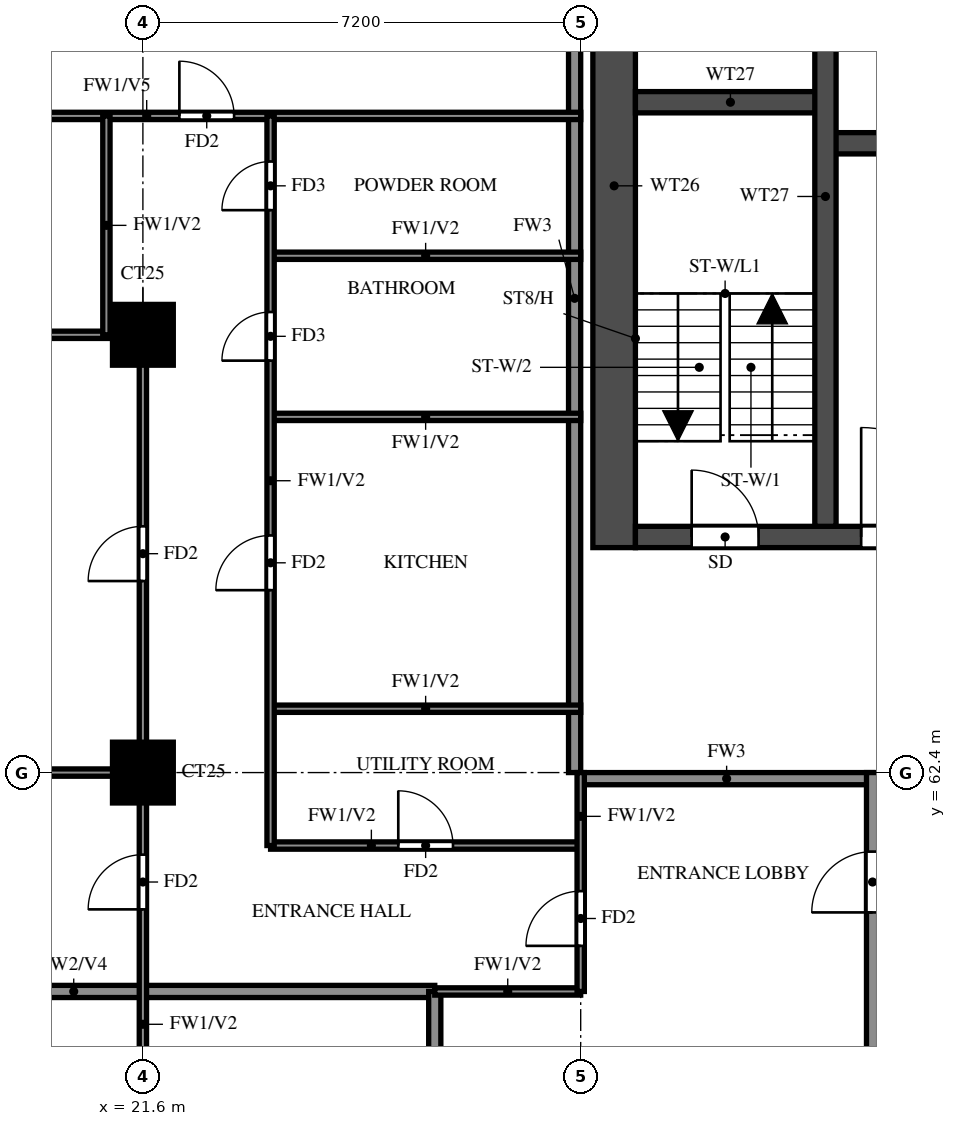
"""IFC4 building model, lengths in metres.
Left out: names, types, materials, properties, quantities, classifications, styles, units other than length and angle.
Written with IfcOpenShell. Run it as: python <this file> out.ifc"""

import sys

from ifc_helpers import new_model, si_unit, direction, frame, frame_2d, origin, origin_2d, place, context, subcontext, project, spatial, rectangle, extrude, source, transform, mapped, element, fill, save


model = new_model("IFC4")
c1 = context("Model", 3, precision=1e-05, world=origin(), true_north=direction((0.0, 1.0)))
c2 = subcontext(c1, "Body", "Model", "MODEL_VIEW")
j1 = project(units=[si_unit("LENGTHUNIT", "METRE"), si_unit("PLANEANGLEUNIT", "RADIAN")], contexts=[c1])
p1 = place(None, origin())
s1 = spatial("IfcSite", under=j1, at=p1, CompositionType="ELEMENT")
p2 = place(p1, origin())
s2 = spatial("IfcBuilding", under=s1, at=p2, CompositionType="ELEMENT")
p3 = place(p2, frame((0.0, 0.0, 157.0)))
s3 = spatial("IfcBuildingStorey", under=s2, at=p3, CompositionType="ELEMENT", Elevation=157.0)
m1 = source(origin(), c2, "Body", "SweptSolid", [
    extrude(rectangle(XDim=1.0, YDim=1.0, at=origin_2d()), origin(), (0.0, 0.0, 1.0), 3.2),
])
for number, where, z_axis, x_axis in (
    (1, (21.6, 62.4, 0.0), (0.0, 0.0, 1.0), (1.0, 0.0, 0.0)),
    (2, (21.6, 69.6, 0.0), (0.0, 0.0, 1.0), (1.0, 0.0, 0.0)),
):
    element("IfcColumn", number, at=place(p3, frame(where, z_axis=z_axis, x_axis=x_axis)), inside=s3, PredefinedType="COLUMN", context=c2, shape_type="MappedRepresentation", body=[
        mapped(m1, transform((0.0, 0.0, 0.0))),
    ])
p4 = place(p3, frame((29.35, 66.1, 0.0), z_axis=(0.0, 0.0, 1.0), x_axis=(0.0, 1.0, 0.0)))
e3 = element("IfcWall", 3, at=p4, inside=s3, PredefinedType="SHEAR", context=c2, shape_type="SweptSolid", body=[
    extrude(rectangle(XDim=11.9, YDim=0.7, at=frame_2d((5.95, 0.0))), origin(), (0.0, 0.0, 1.0), 3.2),
])
p5 = place(p3, frame((29.7, 66.275, 0.0), z_axis=(0.0, 0.0, 1.0), x_axis=(1.0, 0.0, 0.0)))
e4 = element("IfcWall", 4, at=p5, inside=s3, PredefinedType="SHEAR", context=c2, shape_type="SweptSolid", body=[
    extrude(rectangle(XDim=41.4, YDim=0.35, at=frame_2d((20.7, 0.0))), origin(), (0.0, 0.0, 1.0), 3.2),
])
p6 = place(p5, frame((0.925, 0.0, 0.0)))
e5 = element("IfcOpeningElement", 5, at=p6, cuts=e4, PredefinedType="OPENING", context=c2, shape_type="SweptSolid", body=[
    extrude(rectangle(XDim=1.1, YDim=2.1, at=frame_2d((0.55, 1.05))), frame((0.0, 0.185, 0.0), z_axis=(0.0, -1.0, 0.0), x_axis=(1.0, 0.0, 0.0)), (0.0, 0.0, 1.0), 0.37),
])
p7 = place(p5, frame((3.712, 0.0, 0.0)))
e6 = element("IfcOpeningElement", 6, at=p7, cuts=e4, PredefinedType="OPENING", context=c2, shape_type="SweptSolid", body=[
    extrude(rectangle(XDim=1.8, YDim=2.1, at=frame_2d((0.9, 1.05))), frame((0.0, 0.185, 0.0), z_axis=(0.0, -1.0, 0.0), x_axis=(1.0, 0.0, 0.0)), (0.0, 0.0, 1.0), 0.37),
])
p8 = place(p3, frame((32.825, 72.75, 0.0), z_axis=(0.0, 0.0, 1.0), x_axis=(1.0, 0.0, 0.0)))
e7 = element("IfcWall", 7, at=p8, inside=s3, PredefinedType="SHEAR", context=c2, shape_type="SweptSolid", body=[
    extrude(rectangle(XDim=35.15, YDim=0.35, at=frame_2d((17.575, 0.0))), origin(), (0.0, 0.0, 1.0), 3.2),
])
p9 = place(p8, frame((19.8, 0.0, 0.0)))
e8 = element("IfcOpeningElement", 8, at=p9, cuts=e7, PredefinedType="OPENING", context=c2, shape_type="SweptSolid", body=[
    extrude(rectangle(XDim=1.1, YDim=2.1, at=frame_2d((0.55, 1.05))), frame((0.0, 0.185, 0.0), z_axis=(0.0, -1.0, 0.0), x_axis=(1.0, 0.0, 0.0)), (0.0, 0.0, 1.0), 0.37),
])
p10 = place(p8, frame((27.7, 0.0, 0.0)))
e9 = element("IfcOpeningElement", 9, at=p10, cuts=e7, PredefinedType="OPENING", context=c2, shape_type="SweptSolid", body=[
    extrude(rectangle(XDim=1.1, YDim=2.1, at=frame_2d((0.55, 1.05))), frame((0.0, 0.185, 0.0), z_axis=(0.0, -1.0, 0.0), x_axis=(1.0, 0.0, 0.0)), (0.0, 0.0, 1.0), 0.37),
])
p11 = place(p8, frame((30.3, 0.0, 0.0)))
e10 = element("IfcOpeningElement", 10, at=p11, cuts=e7, PredefinedType="OPENING", context=c2, shape_type="SweptSolid", body=[
    extrude(rectangle(XDim=1.1, YDim=2.1, at=frame_2d((0.55, 1.05))), frame((0.0, 0.185, 0.0), z_axis=(0.0, -1.0, 0.0), x_axis=(1.0, 0.0, 0.0)), (0.0, 0.0, 1.0), 0.37),
])
p12 = place(p8, frame((3.8, 0.0, 0.0)))
e11 = element("IfcOpeningElement", 11, at=p12, cuts=e7, PredefinedType="OPENING", context=c2, shape_type="SweptSolid", body=[
    extrude(rectangle(XDim=1.1, YDim=2.1, at=frame_2d((0.55, 1.05))), frame((0.0, 0.185, 0.0), z_axis=(0.0, -1.0, 0.0), x_axis=(1.0, 0.0, 0.0)), (0.0, 0.0, 1.0), 0.37),
])
p13 = place(p8, frame((6.55, 0.0, 0.0)))
e12 = element("IfcOpeningElement", 12, at=p13, cuts=e7, PredefinedType="OPENING", context=c2, shape_type="SweptSolid", body=[
    extrude(rectangle(XDim=1.1, YDim=2.1, at=frame_2d((0.55, 1.05))), frame((0.0, 0.185, 0.0), z_axis=(0.0, -1.0, 0.0), x_axis=(1.0, 0.0, 0.0)), (0.0, 0.0, 1.0), 0.37),
])
p14 = place(p8, frame((9.3, 0.0, 0.0)))
e13 = element("IfcOpeningElement", 13, at=p14, cuts=e7, PredefinedType="OPENING", context=c2, shape_type="SweptSolid", body=[
    extrude(rectangle(XDim=1.1, YDim=2.1, at=frame_2d((0.55, 1.05))), frame((0.0, 0.185, 0.0), z_axis=(0.0, -1.0, 0.0), x_axis=(1.0, 0.0, 0.0)), (0.0, 0.0, 1.0), 0.37),
])
p15 = place(p8, frame((12.05, 0.0, 0.0)))
e14 = element("IfcOpeningElement", 14, at=p15, cuts=e7, PredefinedType="OPENING", context=c2, shape_type="SweptSolid", body=[
    extrude(rectangle(XDim=1.1, YDim=2.1, at=frame_2d((0.55, 1.05))), frame((0.0, 0.185, 0.0), z_axis=(0.0, -1.0, 0.0), x_axis=(1.0, 0.0, 0.0)), (0.0, 0.0, 1.0), 0.37),
])
p16 = place(p8, frame((14.8, 0.0, 0.0)))
e15 = element("IfcOpeningElement", 15, at=p16, cuts=e7, PredefinedType="OPENING", context=c2, shape_type="SweptSolid", body=[
    extrude(rectangle(XDim=1.1, YDim=2.1, at=frame_2d((0.55, 1.05))), frame((0.0, 0.185, 0.0), z_axis=(0.0, -1.0, 0.0), x_axis=(1.0, 0.0, 0.0)), (0.0, 0.0, 1.0), 0.37),
])
p17 = place(p8, frame((17.55, 0.0, 0.0)))
e16 = element("IfcOpeningElement", 16, at=p17, cuts=e7, PredefinedType="OPENING", context=c2, shape_type="SweptSolid", body=[
    extrude(rectangle(XDim=1.1, YDim=2.1, at=frame_2d((0.55, 1.05))), frame((0.0, 0.185, 0.0), z_axis=(0.0, -1.0, 0.0), x_axis=(1.0, 0.0, 0.0)), (0.0, 0.0, 1.0), 0.37),
])
p18 = place(p8, frame((0.938, 0.0, 0.0)))
e17 = element("IfcOpeningElement", 17, at=p18, cuts=e7, PredefinedType="OPENING", context=c2, shape_type="SweptSolid", body=[
    extrude(rectangle(XDim=1.1, YDim=2.1, at=frame_2d((0.55, 1.05))), frame((0.0, 0.185, 0.0), z_axis=(0.0, -1.0, 0.0), x_axis=(1.0, 0.0, 0.0)), (0.0, 0.0, 1.0), 0.37),
])
p19 = place(p3, frame((29.7, 73.425, 0.0), z_axis=(0.0, 0.0, 1.0), x_axis=(1.0, 0.0, 0.0)))
e18 = element("IfcWall", 18, at=p19, inside=s3, PredefinedType="SHEAR", context=c2, shape_type="SweptSolid", body=[
    extrude(rectangle(XDim=3.125, YDim=0.35, at=frame_2d((1.562, 0.0))), origin(), (0.0, 0.0, 1.0), 3.2),
])
p20 = place(p3, frame((32.825, 66.45, 0.0), z_axis=(0.0, 0.0, 1.0), x_axis=(0.0, 1.0, 0.0)))
e19 = element("IfcWall", 19, at=p20, inside=s3, PredefinedType="SHEAR", context=c2, shape_type="SweptSolid", body=[
    extrude(rectangle(XDim=10.85, YDim=0.35, at=frame_2d((5.425, 0.0))), origin(), (0.0, 0.0, 1.0), 3.2),
])
p21 = place(p3, frame((28.8, 62.3, 0.0), z_axis=(0.0, 0.0, 1.0), x_axis=(1.0, 0.0, 0.0)))
e20 = element("IfcWall", 20, at=p21, inside=s3, PredefinedType="SOLIDWALL", context=c2, shape_type="SweptSolid", body=[
    extrude(rectangle(XDim=4.8, YDim=0.2, at=frame_2d((2.4, 0.0))), origin(), (0.0, 0.0, 1.0), 3.2),
])
p22 = place(p3, frame((28.7, 62.4, 0.0), z_axis=(0.0, 0.0, 1.0), x_axis=(0.0, 1.0, 0.0)))
e21 = element("IfcWall", 21, at=p22, inside=s3, PredefinedType="SOLIDWALL", context=c2, shape_type="SweptSolid", body=[
    extrude(rectangle(XDim=15.6, YDim=0.2, at=frame_2d((7.8, 0.0))), origin(), (0.0, 0.0, 1.0), 3.2),
])
p23 = place(p3, frame((33.6, 50.4, 0.0), z_axis=(0.0, 0.0, 1.0), x_axis=(0.0, 1.0, 0.0)))
e22 = element("IfcWall", 22, at=p23, inside=s3, PredefinedType="SOLIDWALL", context=c2, shape_type="SweptSolid", body=[
    extrude(rectangle(XDim=12.0, YDim=0.2, at=frame_2d((6.0, 0.0))), origin(), (0.0, 0.0, 1.0), 3.2),
])
p24 = place(p23, frame((0.7, 0.0, 0.0)))
e23 = element("IfcOpeningElement", 23, at=p24, cuts=e22, PredefinedType="OPENING", context=c2, shape_type="SweptSolid", body=[
    extrude(rectangle(XDim=1.0, YDim=2.1, at=frame_2d((0.5, 1.05))), frame((0.0, 0.11, 0.0), z_axis=(0.0, -1.0, 0.0), x_axis=(1.0, 0.0, 0.0)), (0.0, 0.0, 1.0), 0.22),
])
p25 = place(p23, frame((9.7, 0.0, 0.0)))
e24 = element("IfcOpeningElement", 24, at=p25, cuts=e22, PredefinedType="OPENING", context=c2, shape_type="SweptSolid", body=[
    extrude(rectangle(XDim=1.0, YDim=2.1, at=frame_2d((0.5, 1.05))), frame((0.0, 0.11, 0.0), z_axis=(0.0, -1.0, 0.0), x_axis=(1.0, 0.0, 0.0)), (0.0, 0.0, 1.0), 0.22),
])
p26 = place(p3, frame((14.525, 58.8, 0.0), z_axis=(0.0, 0.0, 1.0), x_axis=(1.0, 0.0, 0.0)))
e25 = element("IfcWall", 25, at=p26, inside=s3, PredefinedType="SOLIDWALL", context=c2, shape_type="SweptSolid", body=[
    extrude(rectangle(XDim=11.875, YDim=0.2, at=frame_2d((5.938, 0.0))), origin(), (0.0, 0.0, 1.0), 2.3),
])
p27 = place(p3, frame((26.4, 56.4, 0.0), z_axis=(0.0, 0.0, 1.0), x_axis=(0.0, 1.0, 0.0)))
e26 = element("IfcWall", 26, at=p27, inside=s3, PredefinedType="SOLIDWALL", context=c2, shape_type="SweptSolid", body=[
    extrude(rectangle(XDim=2.4, YDim=0.2, at=frame_2d((1.2, 0.0))), origin(), (0.0, 0.0, 1.0), 3.2),
])
p28 = place(p3, frame((26.4, 58.8, 0.0), z_axis=(0.0, 0.0, 1.0), x_axis=(1.0, 0.0, 0.0)))
e27 = element("IfcWall", 27, at=p28, inside=s3, PredefinedType="PARTITIONING", context=c2, shape_type="SweptSolid", body=[
    extrude(rectangle(XDim=2.4, YDim=0.12, at=frame_2d((1.2, 0.0))), origin(), (0.0, 0.0, 1.0), 3.2),
])
p29 = place(p3, frame((23.7, 61.2, 0.0), z_axis=(0.0, 0.0, 1.0), x_axis=(1.0, 0.0, 0.0)))
e28 = element("IfcWall", 28, at=p29, inside=s3, PredefinedType="PARTITIONING", context=c2, shape_type="SweptSolid", body=[
    extrude(rectangle(XDim=5.1, YDim=0.12, at=frame_2d((2.55, 0.0))), origin(), (0.0, 0.0, 1.0), 3.2),
])
p30 = place(p29, frame((2.1, 0.0, 0.0)))
e29 = element("IfcOpeningElement", 29, at=p30, cuts=e28, PredefinedType="OPENING", context=c2, shape_type="SweptSolid", body=[
    extrude(rectangle(XDim=0.9, YDim=2.1, at=frame_2d((0.45, 1.05))), frame((0.0, 0.07, 0.0), z_axis=(0.0, -1.0, 0.0), x_axis=(1.0, 0.0, 0.0)), (0.0, 0.0, 1.0), 0.14),
])
p31 = place(p3, frame((14.525, 62.4, 0.0), z_axis=(0.0, 0.0, 1.0), x_axis=(1.0, 0.0, 0.0)))
e30 = element("IfcWall", 30, at=p31, inside=s3, PredefinedType="PARTITIONING", context=c2, shape_type="SweptSolid", body=[
    extrude(rectangle(XDim=7.075, YDim=0.12, at=frame_2d((3.538, 0.0))), origin(), (0.0, 0.0, 1.0), 3.2),
])
for number, where, z_axis, x_axis in (
    (31, (23.7, 63.45, 0.0), (0.0, 0.0, 1.0), (1.0, 0.0, 0.0)),
    (32, (23.7, 68.25, 0.0), (0.0, 0.0, 1.0), (1.0, 0.0, 0.0)),
):
    element("IfcWall", number, at=place(p3, frame(where, z_axis=z_axis, x_axis=x_axis)), inside=s3, PredefinedType="PARTITIONING", context=c2, shape_type="SweptSolid", body=[
        extrude(rectangle(XDim=5.1, YDim=0.12, at=frame_2d((2.55, 0.0))), origin(), (0.0, 0.0, 1.0), 3.2),
    ])
p32 = place(p3, frame((14.525, 69.6, 0.0), z_axis=(0.0, 0.0, 1.0), x_axis=(1.0, 0.0, 0.0)))
e33 = element("IfcWall", 33, at=p32, inside=s3, PredefinedType="PARTITIONING", context=c2, shape_type="SweptSolid", body=[
    extrude(rectangle(XDim=7.075, YDim=0.12, at=frame_2d((3.538, 0.0))), origin(), (0.0, 0.0, 1.0), 3.2),
])
p33 = place(p32, frame((2.837, 0.0, 0.0)))
e34 = element("IfcOpeningElement", 34, at=p33, cuts=e33, PredefinedType="OPENING", context=c2, shape_type="SweptSolid", body=[
    extrude(rectangle(XDim=0.8, YDim=2.1, at=frame_2d((0.4, 1.05))), frame((0.0, 0.07, 0.0), z_axis=(0.0, -1.0, 0.0), x_axis=(1.0, 0.0, 0.0)), (0.0, 0.0, 1.0), 0.14),
])
p34 = place(p3, frame((23.7, 70.9, 0.0), z_axis=(0.0, 0.0, 1.0), x_axis=(1.0, 0.0, 0.0)))
e35 = element("IfcWall", 35, at=p34, inside=s3, PredefinedType="PARTITIONING", context=c2, shape_type="SweptSolid", body=[
    extrude(rectangle(XDim=5.1, YDim=0.12, at=frame_2d((2.55, 0.0))), origin(), (0.0, 0.0, 1.0), 3.2),
])
p35 = place(p3, frame((14.525, 73.2, 0.0), z_axis=(0.0, 0.0, 1.0), x_axis=(1.0, 0.0, 0.0)))
e36 = element("IfcWall", 36, at=p35, inside=s3, PredefinedType="PARTITIONING", context=c2, shape_type="SweptSolid", body=[
    extrude(rectangle(XDim=14.275, YDim=0.12, at=frame_2d((7.138, 0.0))), origin(), (0.0, 0.0, 1.0), 2.3),
])
p36 = place(p35, frame((7.675, 0.0, 0.0)))
e37 = element("IfcOpeningElement", 37, at=p36, cuts=e36, PredefinedType="OPENING", context=c2, shape_type="SweptSolid", body=[
    extrude(rectangle(XDim=0.9, YDim=2.1, at=frame_2d((0.45, 1.05))), frame((0.0, 0.07, 0.0), z_axis=(0.0, -1.0, 0.0), x_axis=(1.0, 0.0, 0.0)), (0.0, 0.0, 1.0), 0.14),
])
p37 = place(p3, frame((21.0, 69.6, 0.0), z_axis=(0.0, 0.0, 1.0), x_axis=(0.0, 1.0, 0.0)))
e38 = element("IfcWall", 38, at=p37, inside=s3, PredefinedType="PARTITIONING", context=c2, shape_type="SweptSolid", body=[
    extrude(rectangle(XDim=3.6, YDim=0.12, at=frame_2d((1.8, 0.0))), origin(), (0.0, 0.0, 1.0), 3.2),
])
p38 = place(p3, frame((21.6, 48.0, 0.0), z_axis=(0.0, 0.0, 1.0), x_axis=(0.0, 1.0, 0.0)))
e39 = element("IfcWall", 39, at=p38, inside=s3, PredefinedType="PARTITIONING", context=c2, shape_type="SweptSolid", body=[
    extrude(rectangle(XDim=21.6, YDim=0.12, at=frame_2d((10.8, 0.0))), origin(), (0.0, 0.0, 1.0), 3.2),
])
p39 = place(p38, frame((2.85, 0.0, 0.0)))
e40 = element("IfcOpeningElement", 40, at=p39, cuts=e39, PredefinedType="OPENING", context=c2, shape_type="SweptSolid", body=[
    extrude(rectangle(XDim=1.5, YDim=2.1, at=frame_2d((0.75, 1.05))), frame((0.0, 0.07, 0.0), z_axis=(0.0, -1.0, 0.0), x_axis=(1.0, 0.0, 0.0)), (0.0, 0.0, 1.0), 0.14),
])
p40 = place(p38, frame((8.55, 0.0, 0.0)))
e41 = element("IfcOpeningElement", 41, at=p40, cuts=e39, PredefinedType="OPENING", context=c2, shape_type="SweptSolid", body=[
    extrude(rectangle(XDim=0.9, YDim=2.1, at=frame_2d((0.45, 1.05))), frame((0.0, 0.07, 0.0), z_axis=(0.0, -1.0, 0.0), x_axis=(1.0, 0.0, 0.0)), (0.0, 0.0, 1.0), 0.14),
])
p41 = place(p38, frame((12.15, 0.0, 0.0)))
e42 = element("IfcOpeningElement", 42, at=p41, cuts=e39, PredefinedType="OPENING", context=c2, shape_type="SweptSolid", body=[
    extrude(rectangle(XDim=0.9, YDim=2.1, at=frame_2d((0.45, 1.05))), frame((0.0, 0.07, 0.0), z_axis=(0.0, -1.0, 0.0), x_axis=(1.0, 0.0, 0.0)), (0.0, 0.0, 1.0), 0.14),
])
p42 = place(p38, frame((17.55, 0.0, 0.0)))
e43 = element("IfcOpeningElement", 43, at=p42, cuts=e39, PredefinedType="OPENING", context=c2, shape_type="SweptSolid", body=[
    extrude(rectangle(XDim=0.9, YDim=2.1, at=frame_2d((0.45, 1.05))), frame((0.0, 0.07, 0.0), z_axis=(0.0, -1.0, 0.0), x_axis=(1.0, 0.0, 0.0)), (0.0, 0.0, 1.0), 0.14),
])
p43 = place(p3, frame((23.7, 61.2, 0.0), z_axis=(0.0, 0.0, 1.0), x_axis=(0.0, 1.0, 0.0)))
e44 = element("IfcWall", 44, at=p43, inside=s3, PredefinedType="PARTITIONING", context=c2, shape_type="SweptSolid", body=[
    extrude(rectangle(XDim=12.0, YDim=0.12, at=frame_2d((6.0, 0.0))), origin(), (0.0, 0.0, 1.0), 3.2),
])
p44 = place(p43, frame((4.2, 0.0, 0.0)))
e45 = element("IfcOpeningElement", 45, at=p44, cuts=e44, PredefinedType="OPENING", context=c2, shape_type="SweptSolid", body=[
    extrude(rectangle(XDim=0.9, YDim=2.1, at=frame_2d((0.45, 1.05))), frame((0.0, 0.07, 0.0), z_axis=(0.0, -1.0, 0.0), x_axis=(1.0, 0.0, 0.0)), (0.0, 0.0, 1.0), 0.14),
])
p45 = place(p43, frame((7.975, 0.0, 0.0)))
e46 = element("IfcOpeningElement", 46, at=p45, cuts=e44, PredefinedType="OPENING", context=c2, shape_type="SweptSolid", body=[
    extrude(rectangle(XDim=0.8, YDim=2.1, at=frame_2d((0.4, 1.05))), frame((0.0, 0.07, 0.0), z_axis=(0.0, -1.0, 0.0), x_axis=(1.0, 0.0, 0.0)), (0.0, 0.0, 1.0), 0.14),
])
p46 = place(p43, frame((10.45, 0.0, 0.0)))
e47 = element("IfcOpeningElement", 47, at=p46, cuts=e44, PredefinedType="OPENING", context=c2, shape_type="SweptSolid", body=[
    extrude(rectangle(XDim=0.8, YDim=2.1, at=frame_2d((0.4, 1.05))), frame((0.0, 0.07, 0.0), z_axis=(0.0, -1.0, 0.0), x_axis=(1.0, 0.0, 0.0)), (0.0, 0.0, 1.0), 0.14),
])
p47 = place(p3, frame((28.8, 58.8, 0.0), z_axis=(0.0, 0.0, 1.0), x_axis=(0.0, 1.0, 0.0)))
e48 = element("IfcWall", 48, at=p47, inside=s3, PredefinedType="PARTITIONING", context=c2, shape_type="SweptSolid", body=[
    extrude(rectangle(XDim=3.6, YDim=0.12, at=frame_2d((1.8, 0.0))), origin(), (0.0, 0.0, 1.0), 3.2),
])
p48 = place(p47, frame((0.75, 0.0, 0.0)))
e49 = element("IfcOpeningElement", 49, at=p48, cuts=e48, PredefinedType="OPENING", context=c2, shape_type="SweptSolid", body=[
    extrude(rectangle(XDim=0.9, YDim=2.1, at=frame_2d((0.45, 1.05))), frame((0.0, 0.07, 0.0), z_axis=(0.0, -1.0, 0.0), x_axis=(1.0, 0.0, 0.0)), (0.0, 0.0, 1.0), 0.14),
])
p49 = place(p6, origin())
e50 = element("IfcDoor", 50, at=p49, inside=s3, OperationType="SINGLE_SWING_LEFT", PredefinedType="DOOR", context=c2, shape_type="SweptSolid", body=[
    extrude(rectangle(XDim=1.1, YDim=2.1, at=frame_2d((0.55, 1.05))), frame((0.0, 0.025, 0.0), z_axis=(0.0, -1.0, 0.0), x_axis=(1.0, 0.0, 0.0)), (0.0, 0.0, 1.0), 0.05),
])
fill(e5, e50)
p50 = place(p7, origin())
e51 = element("IfcDoor", 51, at=p50, inside=s3, OperationType="DOUBLE_DOOR_SINGLE_SWING", PredefinedType="DOOR", context=c2, shape_type="SweptSolid", body=[
    extrude(rectangle(XDim=1.8, YDim=2.1, at=frame_2d((0.9, 1.05))), frame((0.0, 0.025, 0.0), z_axis=(0.0, -1.0, 0.0), x_axis=(1.0, 0.0, 0.0)), (0.0, 0.0, 1.0), 0.05),
])
fill(e6, e51)
p51 = place(p48, origin())
e52 = element("IfcDoor", 52, at=p51, inside=s3, OperationType="SINGLE_SWING_LEFT", PredefinedType="DOOR", context=c2, shape_type="SweptSolid", body=[
    extrude(rectangle(XDim=0.9, YDim=2.1, at=frame_2d((0.45, 1.05))), frame((0.0, 0.025, 0.0), z_axis=(0.0, -1.0, 0.0), x_axis=(1.0, 0.0, 0.0)), (0.0, 0.0, 1.0), 0.05),
])
fill(e49, e52)
p52 = place(p25, origin())
e53 = element("IfcDoor", 53, at=p52, inside=s3, OperationType="SINGLE_SWING_LEFT", PredefinedType="DOOR", context=c2, shape_type="SweptSolid", body=[
    extrude(rectangle(XDim=1.0, YDim=2.1, at=frame_2d((0.5, 1.05))), frame((0.0, 0.025, 0.0), z_axis=(0.0, -1.0, 0.0), x_axis=(1.0, 0.0, 0.0)), (0.0, 0.0, 1.0), 0.05),
])
fill(e24, e53)
p53 = place(p41, origin())
e54 = element("IfcDoor", 54, at=p53, inside=s3, OperationType="SINGLE_SWING_RIGHT", PredefinedType="DOOR", context=c2, shape_type="SweptSolid", body=[
    extrude(rectangle(XDim=0.9, YDim=2.1, at=frame_2d((0.45, 1.05))), frame((0.0, 0.025, 0.0), z_axis=(0.0, -1.0, 0.0), x_axis=(1.0, 0.0, 0.0)), (0.0, 0.0, 1.0), 0.05),
])
fill(e42, e54)
p54 = place(p42, origin())
e55 = element("IfcDoor", 55, at=p54, inside=s3, OperationType="SINGLE_SWING_LEFT", PredefinedType="DOOR", context=c2, shape_type="SweptSolid", body=[
    extrude(rectangle(XDim=0.9, YDim=2.1, at=frame_2d((0.45, 1.05))), frame((0.0, 0.025, 0.0), z_axis=(0.0, -1.0, 0.0), x_axis=(1.0, 0.0, 0.0)), (0.0, 0.0, 1.0), 0.05),
])
fill(e43, e55)
p55 = place(p36, origin())
e56 = element("IfcDoor", 56, at=p55, inside=s3, OperationType="SINGLE_SWING_RIGHT", PredefinedType="DOOR", context=c2, shape_type="SweptSolid", body=[
    extrude(rectangle(XDim=0.9, YDim=2.1, at=frame_2d((0.45, 1.05))), frame((0.0, 0.025, 0.0), z_axis=(0.0, -1.0, 0.0), x_axis=(1.0, 0.0, 0.0)), (0.0, 0.0, 1.0), 0.05),
])
fill(e37, e56)
p56 = place(p30, origin())
e57 = element("IfcDoor", 57, at=p56, inside=s3, OperationType="SINGLE_SWING_LEFT", PredefinedType="DOOR", context=c2, shape_type="SweptSolid", body=[
    extrude(rectangle(XDim=0.9, YDim=2.1, at=frame_2d((0.45, 1.05))), frame((0.0, 0.025, 0.0), z_axis=(0.0, -1.0, 0.0), x_axis=(1.0, 0.0, 0.0)), (0.0, 0.0, 1.0), 0.05),
])
fill(e29, e57)
p57 = place(p44, origin())
e58 = element("IfcDoor", 58, at=p57, inside=s3, OperationType="SINGLE_SWING_LEFT", PredefinedType="DOOR", context=c2, shape_type="SweptSolid", body=[
    extrude(rectangle(XDim=0.9, YDim=2.1, at=frame_2d((0.45, 1.05))), frame((0.0, 0.025, 0.0), z_axis=(0.0, -1.0, 0.0), x_axis=(1.0, 0.0, 0.0)), (0.0, 0.0, 1.0), 0.05),
])
fill(e45, e58)
p58 = place(p45, origin())
e59 = element("IfcDoor", 59, at=p58, inside=s3, OperationType="SINGLE_SWING_RIGHT", PredefinedType="DOOR", context=c2, shape_type="SweptSolid", body=[
    extrude(rectangle(XDim=0.8, YDim=2.1, at=frame_2d((0.4, 1.05))), frame((0.0, 0.025, 0.0), z_axis=(0.0, -1.0, 0.0), x_axis=(1.0, 0.0, 0.0)), (0.0, 0.0, 1.0), 0.05),
])
fill(e46, e59)
p59 = place(p46, origin())
e60 = element("IfcDoor", 60, at=p59, inside=s3, OperationType="SINGLE_SWING_LEFT", PredefinedType="DOOR", context=c2, shape_type="SweptSolid", body=[
    extrude(rectangle(XDim=0.8, YDim=2.1, at=frame_2d((0.4, 1.05))), frame((0.0, 0.025, 0.0), z_axis=(0.0, -1.0, 0.0), x_axis=(1.0, 0.0, 0.0)), (0.0, 0.0, 1.0), 0.05),
])
fill(e47, e60)
save(model, sys.argv[1])
